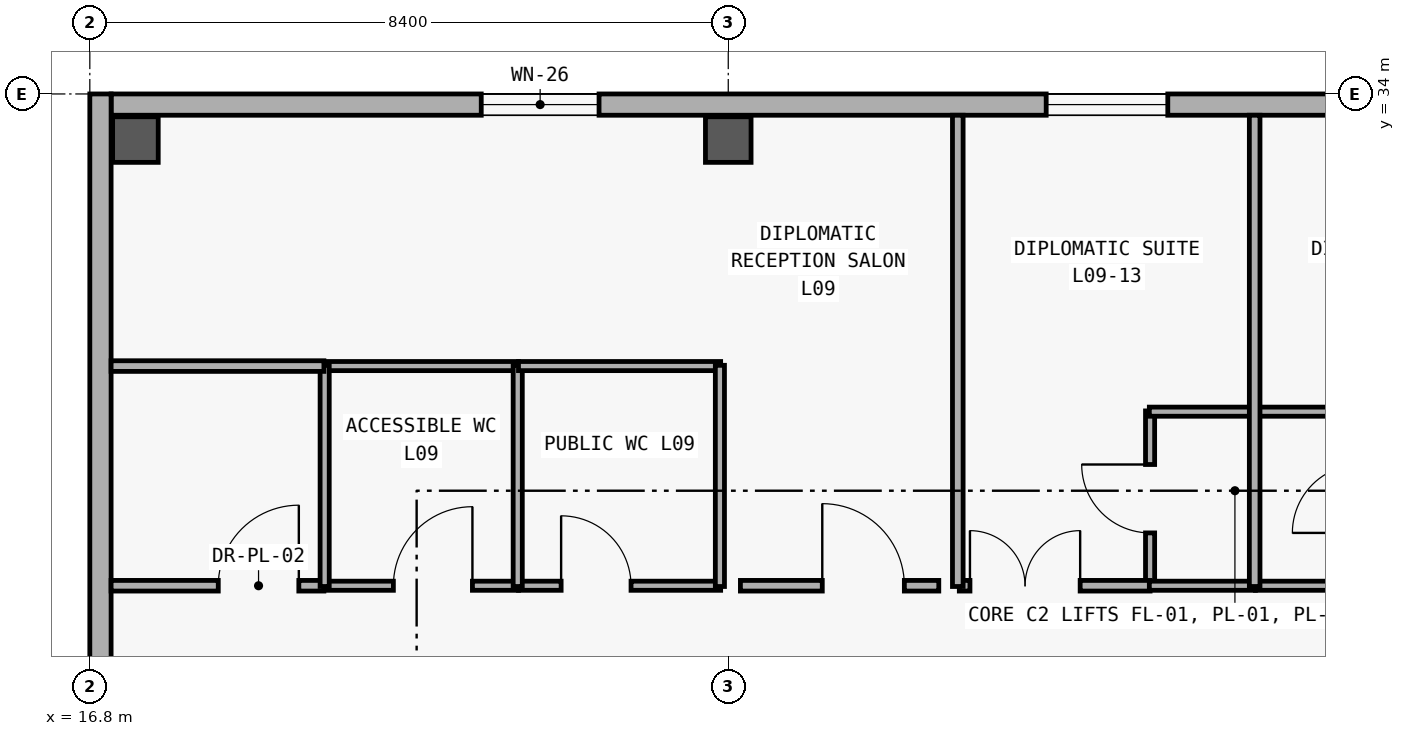
"""IFC4 building model, lengths in metres.
Left out: names, types, materials, properties, quantities, classifications, styles, units other than length and angle.
Written with IfcOpenShell. Run it as: python <this file> out.ifc"""

import sys

from ifc_helpers import new_model, si_unit, direction, frame, frame_2d, origin, origin_2d, place, context, subcontext, project, spatial, rectangle, extrude, element, fill, save


model = new_model("IFC4")
c1 = context("Model", 3, precision=1e-05, world=origin(), true_north=direction((0.0, 1.0)))
c2 = subcontext(c1, "Body", "Model", "MODEL_VIEW")
j1 = project(units=[si_unit("LENGTHUNIT", "METRE"), si_unit("PLANEANGLEUNIT", "RADIAN")], contexts=[c1])
p1 = place(None, origin())
s1 = spatial("IfcSite", under=j1, at=p1, CompositionType="ELEMENT")
p2 = place(p1, origin())
s2 = spatial("IfcBuilding", under=s1, at=p2, CompositionType="ELEMENT")
p3 = place(p2, frame((0.0, 0.0, 37.2)))
s3 = spatial("IfcBuildingStorey", under=s2, at=p3, CompositionType="ELEMENT", Elevation=37.2)
for number, where, z_axis, x_axis in (
    (1, (17.4, 33.4, 0.0), (0.0, 0.0, 1.0), (1.0, 0.0, 0.0)),
    (2, (25.2, 33.4, 0.0), (0.0, 0.0, 1.0), (1.0, 0.0, 0.0)),
):
    element("IfcColumn", number, at=place(p3, frame(where, z_axis=z_axis, x_axis=x_axis)), inside=s3, PredefinedType="COLUMN", context=c2, shape_type="SweptSolid", body=[
        extrude(rectangle(XDim=0.6, YDim=0.6, at=origin_2d()), origin(), (0.0, 0.0, 1.0), 3.6),
    ])
p4 = place(p3, frame((17.08, 33.86, 0.0), z_axis=(0.0, 0.0, 1.0), x_axis=(1.0, 0.0, 0.0)))
e3 = element("IfcWall", 3, at=p4, inside=s3, PredefinedType="SOLIDWALL", context=c2, shape_type="SweptSolid", body=[
    extrude(rectangle(XDim=58.24, YDim=0.28, at=frame_2d((29.12, 0.0))), origin(), (0.0, 0.0, 1.0), 3.34),
])
p5 = place(p4, frame((4.87, 0.0, 0.85)))
e4 = element("IfcOpeningElement", 4, at=p5, cuts=e3, PredefinedType="OPENING", context=c2, shape_type="SweptSolid", body=[
    extrude(rectangle(XDim=1.55, YDim=1.65, at=frame_2d((0.775, 0.825))), frame((0.0, 0.15, 0.0), z_axis=(0.0, -1.0, 0.0), x_axis=(1.0, 0.0, 0.0)), (0.0, 0.0, 1.0), 0.3),
])
p6 = place(p4, frame((12.303, 0.0, 0.85)))
e5 = element("IfcOpeningElement", 5, at=p6, cuts=e3, PredefinedType="OPENING", context=c2, shape_type="SweptSolid", body=[
    extrude(rectangle(XDim=1.6, YDim=1.6, at=frame_2d((0.8, 0.8))), frame((0.0, 0.15, 0.0), z_axis=(0.0, -1.0, 0.0), x_axis=(1.0, 0.0, 0.0)), (0.0, 0.0, 1.0), 0.3),
])
p7 = place(p4, frame((16.109, 0.0, 0.85)))
e6 = element("IfcOpeningElement", 6, at=p7, cuts=e3, PredefinedType="OPENING", context=c2, shape_type="SweptSolid", body=[
    extrude(rectangle(XDim=1.8, YDim=1.6, at=frame_2d((0.9, 0.8))), frame((0.0, 0.15, 0.0), z_axis=(0.0, -1.0, 0.0), x_axis=(1.0, 0.0, 0.0)), (0.0, 0.0, 1.0), 0.3),
])
p8 = place(p4, frame((19.915, 0.0, 0.85)))
e7 = element("IfcOpeningElement", 7, at=p8, cuts=e3, PredefinedType="OPENING", context=c2, shape_type="SweptSolid", body=[
    extrude(rectangle(XDim=2.0, YDim=1.65, at=frame_2d((1.0, 0.825))), frame((0.0, 0.15, 0.0), z_axis=(0.0, -1.0, 0.0), x_axis=(1.0, 0.0, 0.0)), (0.0, 0.0, 1.0), 0.3),
])
p9 = place(p4, frame((23.72, 0.0, 0.85)))
e8 = element("IfcOpeningElement", 8, at=p9, cuts=e3, PredefinedType="OPENING", context=c2, shape_type="SweptSolid", body=[
    extrude(rectangle(XDim=2.2, YDim=1.65, at=frame_2d((1.1, 0.825))), frame((0.0, 0.15, 0.0), z_axis=(0.0, -1.0, 0.0), x_axis=(1.0, 0.0, 0.0)), (0.0, 0.0, 1.0), 0.3),
])
p10 = place(p4, frame((27.426, 0.0, 0.85)))
e9 = element("IfcOpeningElement", 9, at=p10, cuts=e3, PredefinedType="OPENING", context=c2, shape_type="SweptSolid", body=[
    extrude(rectangle(XDim=2.6, YDim=2.2, at=frame_2d((1.3, 1.1))), frame((0.0, 0.15, 0.0), z_axis=(0.0, -1.0, 0.0), x_axis=(1.0, 0.0, 0.0)), (0.0, 0.0, 1.0), 0.3),
])
p11 = place(p4, frame((32.007, 0.0, 0.85)))
e10 = element("IfcOpeningElement", 10, at=p11, cuts=e3, PredefinedType="OPENING", context=c2, shape_type="SweptSolid", body=[
    extrude(rectangle(XDim=1.25, YDim=1.45, at=frame_2d((0.625, 0.725))), frame((0.0, 0.15, 0.0), z_axis=(0.0, -1.0, 0.0), x_axis=(1.0, 0.0, 0.0)), (0.0, 0.0, 1.0), 0.3),
])
p12 = place(p4, frame((35.863, 0.0, 0.85)))
e11 = element("IfcOpeningElement", 11, at=p12, cuts=e3, PredefinedType="OPENING", context=c2, shape_type="SweptSolid", body=[
    extrude(rectangle(XDim=1.35, YDim=1.55, at=frame_2d((0.675, 0.775))), frame((0.0, 0.15, 0.0), z_axis=(0.0, -1.0, 0.0), x_axis=(1.0, 0.0, 0.0)), (0.0, 0.0, 1.0), 0.3),
])
p13 = place(p4, frame((39.719, 0.0, 0.85)))
e12 = element("IfcOpeningElement", 12, at=p13, cuts=e3, PredefinedType="OPENING", context=c2, shape_type="SweptSolid", body=[
    extrude(rectangle(XDim=1.45, YDim=1.65, at=frame_2d((0.725, 0.825))), frame((0.0, 0.15, 0.0), z_axis=(0.0, -1.0, 0.0), x_axis=(1.0, 0.0, 0.0)), (0.0, 0.0, 1.0), 0.3),
])
p14 = place(p4, frame((43.575, 0.0, 0.85)))
e13 = element("IfcOpeningElement", 13, at=p14, cuts=e3, PredefinedType="OPENING", context=c2, shape_type="SweptSolid", body=[
    extrude(rectangle(XDim=1.55, YDim=1.65, at=frame_2d((0.775, 0.825))), frame((0.0, 0.15, 0.0), z_axis=(0.0, -1.0, 0.0), x_axis=(1.0, 0.0, 0.0)), (0.0, 0.0, 1.0), 0.3),
])
p15 = place(p4, frame((47.405, 0.0, 0.85)))
e14 = element("IfcOpeningElement", 14, at=p15, cuts=e3, PredefinedType="OPENING", context=c2, shape_type="SweptSolid", body=[
    extrude(rectangle(XDim=1.7, YDim=2.0, at=frame_2d((0.85, 1.0))), frame((0.0, 0.15, 0.0), z_axis=(0.0, -1.0, 0.0), x_axis=(1.0, 0.0, 0.0)), (0.0, 0.0, 1.0), 0.3),
])
p16 = place(p4, frame((51.011, 0.0, 0.85)))
e15 = element("IfcOpeningElement", 15, at=p16, cuts=e3, PredefinedType="OPENING", context=c2, shape_type="SweptSolid", body=[
    extrude(rectangle(XDim=2.3, YDim=2.05, at=frame_2d((1.15, 1.025))), frame((0.0, 0.15, 0.0), z_axis=(0.0, -1.0, 0.0), x_axis=(1.0, 0.0, 0.0)), (0.0, 0.0, 1.0), 0.3),
])
p17 = place(p4, frame((54.692, 0.0, 0.85)))
e16 = element("IfcOpeningElement", 16, at=p17, cuts=e3, PredefinedType="OPENING", context=c2, shape_type="SweptSolid", body=[
    extrude(rectangle(XDim=2.75, YDim=2.1, at=frame_2d((1.375, 1.05))), frame((0.0, 0.15, 0.0), z_axis=(0.0, -1.0, 0.0), x_axis=(1.0, 0.0, 0.0)), (0.0, 0.0, 1.0), 0.3),
])
p18 = place(p3, frame((16.94, 8.8, 0.0), z_axis=(0.0, 0.0, 1.0), x_axis=(0.0, 1.0, 0.0)))
e17 = element("IfcWall", 17, at=p18, inside=s3, PredefinedType="SOLIDWALL", context=c2, shape_type="SweptSolid", body=[
    extrude(rectangle(XDim=25.2, YDim=0.28, at=frame_2d((12.6, 0.0))), origin(), (0.0, 0.0, 1.0), 3.34),
])
p19 = place(p18, frame((1.7, 0.0, 0.95)))
e18 = element("IfcOpeningElement", 18, at=p19, cuts=e17, PredefinedType="OPENING", context=c2, shape_type="SweptSolid", body=[
    extrude(rectangle(XDim=1.6, YDim=1.6, at=frame_2d((0.8, 0.8))), frame((0.0, 0.15, 0.0), z_axis=(0.0, -1.0, 0.0), x_axis=(1.0, 0.0, 0.0)), (0.0, 0.0, 1.0), 0.3),
])
p20 = place(p3, frame((30.75, 27.52, 0.0), z_axis=(0.0, 0.0, 1.0), x_axis=(0.0, 1.0, 0.0)))
e19 = element("IfcWall", 19, at=p20, inside=s3, PredefinedType="PARTITIONING", context=c2, shape_type="SweptSolid", body=[
    extrude(rectangle(XDim=2.31, YDim=0.12, at=frame_2d((1.155, 0.0))), origin(), (0.0, 0.0, 1.0), 2.48),
])
p21 = place(p20, frame((0.705, 0.0, 0.0)))
e20 = element("IfcOpeningElement", 20, at=p21, cuts=e19, PredefinedType="OPENING", context=c2, shape_type="SweptSolid", body=[
    extrude(rectangle(XDim=0.9, YDim=2.18, at=frame_2d((0.45, 1.09))), frame((0.0, 0.07, 0.0), z_axis=(0.0, -1.0, 0.0), x_axis=(1.0, 0.0, 0.0)), (0.0, 0.0, 1.0), 0.14),
])
p22 = place(p3, frame((19.88, 27.53, 0.0), z_axis=(0.0, 0.0, 1.0), x_axis=(1.0, 0.0, 0.0)))
e21 = element("IfcWall", 21, at=p22, inside=s3, PredefinedType="PARTITIONING", context=c2, shape_type="SweptSolid", body=[
    extrude(rectangle(XDim=2.56, YDim=0.12, at=frame_2d((1.28, 0.0))), origin(), (0.0, 0.0, 1.0), 2.48),
])
p23 = place(p22, frame((0.914, 0.0, 0.0)))
e22 = element("IfcOpeningElement", 22, at=p23, cuts=e21, PredefinedType="OPENING", context=c2, shape_type="SweptSolid", body=[
    extrude(rectangle(XDim=1.04, YDim=2.15, at=frame_2d((0.52, 1.075))), frame((0.0, 0.07, 0.0), z_axis=(0.0, -1.0, 0.0), x_axis=(1.0, 0.0, 0.0)), (0.0, 0.0, 1.0), 0.14),
])
p24 = place(p3, frame((22.44, 27.53, 0.0), z_axis=(0.0, 0.0, 1.0), x_axis=(1.0, 0.0, 0.0)))
e23 = element("IfcWall", 23, at=p24, inside=s3, PredefinedType="PARTITIONING", context=c2, shape_type="SweptSolid", body=[
    extrude(rectangle(XDim=2.66, YDim=0.12, at=frame_2d((1.33, 0.0))), origin(), (0.0, 0.0, 1.0), 2.48),
])
p25 = place(p24, frame((0.561, 0.0, 0.0)))
e24 = element("IfcOpeningElement", 24, at=p25, cuts=e23, PredefinedType="OPENING", context=c2, shape_type="SweptSolid", body=[
    extrude(rectangle(XDim=0.92, YDim=2.15, at=frame_2d((0.46, 1.075))), frame((0.0, 0.07, 0.0), z_axis=(0.0, -1.0, 0.0), x_axis=(1.0, 0.0, 0.0)), (0.0, 0.0, 1.0), 0.14),
])
p26 = place(p3, frame((17.08, 27.53, 0.0), z_axis=(0.0, 0.0, 1.0), x_axis=(1.0, 0.0, 0.0)))
e25 = element("IfcWall", 25, at=p26, inside=s3, PredefinedType="PARTITIONING", context=c2, shape_type="SweptSolid", body=[
    extrude(rectangle(XDim=2.8, YDim=0.14, at=frame_2d((1.4, 0.0))), origin(), (0.0, 0.0, 1.0), 2.48),
])
p27 = place(p26, frame((1.41, 0.0, 0.0)))
e26 = element("IfcOpeningElement", 26, at=p27, cuts=e25, PredefinedType="OPENING", context=c2, shape_type="SweptSolid", body=[
    extrude(rectangle(XDim=1.06, YDim=2.2, at=frame_2d((0.53, 1.1))), frame((0.0, 0.08, 0.0), z_axis=(0.0, -1.0, 0.0), x_axis=(1.0, 0.0, 0.0)), (0.0, 0.0, 1.0), 0.16),
])
p28 = place(p3, frame((25.36, 27.53, 0.0), z_axis=(0.0, 0.0, 1.0), x_axis=(1.0, 0.0, 0.0)))
e27 = element("IfcWall", 27, at=p28, inside=s3, PredefinedType="PARTITIONING", context=c2, shape_type="SweptSolid", body=[
    extrude(rectangle(XDim=2.61, YDim=0.14, at=frame_2d((1.305, 0.0))), origin(), (0.0, 0.0, 1.0), 2.48),
])
p29 = place(p28, frame((1.077, 0.0, 0.0)))
e28 = element("IfcOpeningElement", 28, at=p29, cuts=e27, PredefinedType="OPENING", context=c2, shape_type="SweptSolid", body=[
    extrude(rectangle(XDim=1.08, YDim=2.25, at=frame_2d((0.54, 1.125))), frame((0.0, 0.08, 0.0), z_axis=(0.0, -1.0, 0.0), x_axis=(1.0, 0.0, 0.0)), (0.0, 0.0, 1.0), 0.16),
])
p30 = place(p3, frame((28.24, 27.53, 0.0), z_axis=(0.0, 0.0, 1.0), x_axis=(1.0, 0.0, 0.0)))
e29 = element("IfcWall", 29, at=p30, inside=s3, PredefinedType="PARTITIONING", context=c2, shape_type="SweptSolid", body=[
    extrude(rectangle(XDim=2.51, YDim=0.14, at=frame_2d((1.255, 0.0))), origin(), (0.0, 0.0, 1.0), 2.48),
])
p31 = place(p30, frame((0.14, 0.0, 0.0)))
e30 = element("IfcOpeningElement", 30, at=p31, cuts=e29, PredefinedType="OPENING", context=c2, shape_type="SweptSolid", body=[
    extrude(rectangle(XDim=1.45, YDim=2.3, at=frame_2d((0.725, 1.15))), frame((0.0, 0.08, 0.0), z_axis=(0.0, -1.0, 0.0), x_axis=(1.0, 0.0, 0.0)), (0.0, 0.0, 1.0), 0.16),
])
for number, where, z_axis, x_axis in (
    (31, (30.74, 27.53, 0.0), (0.0, 0.0, 1.0), (1.0, 0.0, 0.0)),
    (32, (30.74, 29.82, 0.0), (0.0, 0.0, 1.0), (1.0, 0.0, 0.0)),
    (33, (32.136, 27.53, 0.0), (0.0, 0.0, 1.0), (1.0, 0.0, 0.0)),
    (34, (32.136, 29.82, 0.0), (0.0, 0.0, 1.0), (1.0, 0.0, 0.0)),
):
    element("IfcWall", number, at=place(p3, frame(where, z_axis=z_axis, x_axis=x_axis)), inside=s3, PredefinedType="PARTITIONING", context=c2, shape_type="SweptSolid", body=[
        extrude(rectangle(XDim=1.396, YDim=0.12, at=frame_2d((0.698, 0.0))), origin(), (0.0, 0.0, 1.0), 2.48),
    ])
p32 = place(p3, frame((19.88, 30.42, 0.0), z_axis=(0.0, 0.0, 1.0), x_axis=(1.0, 0.0, 0.0)))
e35 = element("IfcWall", 35, at=p32, inside=s3, PredefinedType="PARTITIONING", context=c2, shape_type="SweptSolid", body=[
    extrude(rectangle(XDim=2.56, YDim=0.12, at=frame_2d((1.28, 0.0))), origin(), (0.0, 0.0, 1.0), 2.48),
])
for number, where, z_axis, x_axis in (
    (36, (19.89, 27.52, 0.0), (0.0, 0.0, 1.0), (0.0, 1.0, 0.0)),
    (37, (22.43, 27.52, 0.0), (0.0, 0.0, 1.0), (0.0, 1.0, 0.0)),
):
    element("IfcWall", number, at=place(p3, frame(where, z_axis=z_axis, x_axis=x_axis)), inside=s3, PredefinedType="PARTITIONING", context=c2, shape_type="SweptSolid", body=[
        extrude(rectangle(XDim=2.91, YDim=0.12, at=frame_2d((1.455, 0.0))), origin(), (0.0, 0.0, 1.0), 2.48),
    ])
p33 = place(p3, frame((22.44, 30.42, 0.0), z_axis=(0.0, 0.0, 1.0), x_axis=(1.0, 0.0, 0.0)))
e38 = element("IfcWall", 38, at=p33, inside=s3, PredefinedType="PARTITIONING", context=c2, shape_type="SweptSolid", body=[
    extrude(rectangle(XDim=2.66, YDim=0.12, at=frame_2d((1.33, 0.0))), origin(), (0.0, 0.0, 1.0), 2.48),
])
p34 = place(p3, frame((25.09, 27.52, 0.0), z_axis=(0.0, 0.0, 1.0), x_axis=(0.0, 1.0, 0.0)))
e39 = element("IfcWall", 39, at=p34, inside=s3, PredefinedType="PARTITIONING", context=c2, shape_type="SweptSolid", body=[
    extrude(rectangle(XDim=2.91, YDim=0.12, at=frame_2d((1.455, 0.0))), origin(), (0.0, 0.0, 1.0), 2.48),
])
p35 = place(p3, frame((17.08, 30.42, 0.0), z_axis=(0.0, 0.0, 1.0), x_axis=(1.0, 0.0, 0.0)))
e40 = element("IfcWall", 40, at=p35, inside=s3, PredefinedType="PARTITIONING", context=c2, shape_type="SweptSolid", body=[
    extrude(rectangle(XDim=2.8, YDim=0.14, at=frame_2d((1.4, 0.0))), origin(), (0.0, 0.0, 1.0), 2.48),
])
for number, where, z_axis, x_axis in (
    (41, (28.22, 27.52, 0.0), (0.0, 0.0, 1.0), (0.0, 1.0, 0.0)),
    (42, (32.126, 27.52, 0.0), (0.0, 0.0, 1.0), (0.0, 1.0, 0.0)),
):
    element("IfcWall", number, at=place(p3, frame(where, z_axis=z_axis, x_axis=x_axis)), inside=s3, PredefinedType="PARTITIONING", context=c2, shape_type="SweptSolid", body=[
        extrude(rectangle(XDim=6.2, YDim=0.14, at=frame_2d((3.1, 0.0))), origin(), (0.0, 0.0, 1.0), 2.48),
    ])
p36 = place(p5, origin())
e43 = element("IfcWindow", 43, at=p36, inside=s3, PartitioningType="SINGLE_PANEL", PredefinedType="WINDOW", context=c2, shape_type="SweptSolid", body=[
    extrude(rectangle(XDim=1.55, YDim=1.65, at=frame_2d((0.775, 0.825))), frame((0.0, 0.03, 0.0), z_axis=(0.0, -1.0, 0.0), x_axis=(1.0, 0.0, 0.0)), (0.0, 0.0, 1.0), 0.06),
])
fill(e4, e43)
p37 = place(p6, origin())
e44 = element("IfcWindow", 44, at=p37, inside=s3, PartitioningType="SINGLE_PANEL", PredefinedType="WINDOW", context=c2, shape_type="SweptSolid", body=[
    extrude(rectangle(XDim=1.6, YDim=1.6, at=frame_2d((0.8, 0.8))), frame((0.0, 0.03, 0.0), z_axis=(0.0, -1.0, 0.0), x_axis=(1.0, 0.0, 0.0)), (0.0, 0.0, 1.0), 0.06),
])
fill(e5, e44)
p38 = place(p21, origin())
e45 = element("IfcDoor", 45, at=p38, inside=s3, OperationType="SINGLE_SWING_RIGHT", PredefinedType="DOOR", context=c2, shape_type="SweptSolid", body=[
    extrude(rectangle(XDim=0.9, YDim=2.18, at=frame_2d((0.45, 1.09))), frame((0.0, 0.025, 0.0), z_axis=(0.0, -1.0, 0.0), x_axis=(1.0, 0.0, 0.0)), (0.0, 0.0, 1.0), 0.05),
])
fill(e20, e45)
p39 = place(p23, origin())
e46 = element("IfcDoor", 46, at=p39, inside=s3, OperationType="SINGLE_SWING_RIGHT", PredefinedType="DOOR", context=c2, shape_type="SweptSolid", body=[
    extrude(rectangle(XDim=1.04, YDim=2.15, at=frame_2d((0.52, 1.075))), frame((0.0, 0.025, 0.0), z_axis=(0.0, -1.0, 0.0), x_axis=(1.0, 0.0, 0.0)), (0.0, 0.0, 1.0), 0.05),
])
fill(e22, e46)
p40 = place(p25, origin())
e47 = element("IfcDoor", 47, at=p40, inside=s3, OperationType="SINGLE_SWING_LEFT", PredefinedType="DOOR", context=c2, shape_type="SweptSolid", body=[
    extrude(rectangle(XDim=0.92, YDim=2.15, at=frame_2d((0.46, 1.075))), frame((0.0, 0.025, 0.0), z_axis=(0.0, -1.0, 0.0), x_axis=(1.0, 0.0, 0.0)), (0.0, 0.0, 1.0), 0.05),
])
fill(e24, e47)
p41 = place(p27, origin())
e48 = element("IfcDoor", 48, at=p41, inside=s3, OperationType="SINGLE_SWING_RIGHT", PredefinedType="DOOR", context=c2, shape_type="SweptSolid", body=[
    extrude(rectangle(XDim=1.06, YDim=2.2, at=frame_2d((0.53, 1.1))), frame((0.0, 0.025, 0.0), z_axis=(0.0, -1.0, 0.0), x_axis=(1.0, 0.0, 0.0)), (0.0, 0.0, 1.0), 0.05),
])
fill(e26, e48)
p42 = place(p29, origin())
e49 = element("IfcDoor", 49, at=p42, inside=s3, OperationType="SINGLE_SWING_LEFT", PredefinedType="DOOR", context=c2, shape_type="SweptSolid", body=[
    extrude(rectangle(XDim=1.08, YDim=2.25, at=frame_2d((0.54, 1.125))), frame((0.0, 0.025, 0.0), z_axis=(0.0, -1.0, 0.0), x_axis=(1.0, 0.0, 0.0)), (0.0, 0.0, 1.0), 0.05),
])
fill(e28, e49)
p43 = place(p31, origin())
e50 = element("IfcDoor", 50, at=p43, inside=s3, OperationType="DOUBLE_DOOR_SINGLE_SWING", PredefinedType="DOOR", context=c2, shape_type="SweptSolid", body=[
    extrude(rectangle(XDim=1.45, YDim=2.3, at=frame_2d((0.725, 1.15))), frame((0.0, 0.025, 0.0), z_axis=(0.0, -1.0, 0.0), x_axis=(1.0, 0.0, 0.0)), (0.0, 0.0, 1.0), 0.05),
])
fill(e30, e50)
save(model, sys.argv[1])
